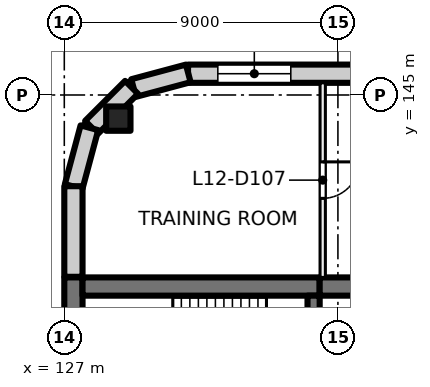
"""IFC4 building model, lengths in metres.
Left out: names, types, materials, properties, quantities, classifications, styles, units other than length and angle.
Written with IfcOpenShell. Run it as: python <this file> out.ifc"""

import sys

from ifc_helpers import new_model, si_unit, direction, frame, frame_2d, origin, origin_2d, place, context, subcontext, project, spatial, rectangle, extrude, element, fill, save


model = new_model("IFC4")
c1 = context("Model", 3, precision=1e-05, world=origin(), true_north=direction((0.0, 1.0)))
c2 = subcontext(c1, "Body", "Model", "MODEL_VIEW")
j1 = project(units=[si_unit("LENGTHUNIT", "METRE"), si_unit("PLANEANGLEUNIT", "RADIAN")], contexts=[c1])
p1 = place(None, origin())
s1 = spatial("IfcSite", under=j1, at=p1, CompositionType="ELEMENT")
p2 = place(p1, origin())
s2 = spatial("IfcBuilding", under=s1, at=p2, CompositionType="ELEMENT")
p3 = place(p2, frame((0.0, 0.0, 55.5)))
s3 = spatial("IfcBuildingStorey", under=s2, at=p3, CompositionType="ELEMENT", Elevation=55.5)
p4 = place(p3, frame((128.777, 144.223, 0.0), z_axis=(0.0, 0.0, 1.0), x_axis=(1.0, 0.0, 0.0)))
e1 = element("IfcColumn", 1, at=p4, inside=s3, PredefinedType="COLUMN", context=c2, shape_type="SweptSolid", body=[
    extrude(rectangle(XDim=0.8, YDim=0.8, at=origin_2d()), origin(), (0.0, 0.0, 1.0), 4.0),
])
p5 = place(p3, frame((127.3, 135.2, 0.0), z_axis=(0.0, 0.0, 1.0), x_axis=(0.0, 1.0, 0.0)))
e2 = element("IfcWall", 2, at=p5, inside=s3, PredefinedType="SHEAR", context=c2, shape_type="SweptSolid", body=[
    extrude(rectangle(XDim=3.8, YDim=0.6, at=frame_2d((1.9, 0.0))), origin(), (0.0, 0.0, 1.0), 4.0),
])
p6 = place(p3, frame((127.6, 138.7, 0.0), z_axis=(0.0, 0.0, 1.0), x_axis=(1.0, 0.0, 0.0)))
e3 = element("IfcWall", 3, at=p6, inside=s3, PredefinedType="SHEAR", context=c2, shape_type="SweptSolid", body=[
    extrude(rectangle(XDim=7.8, YDim=0.6, at=frame_2d((3.9, 0.0))), origin(), (0.0, 0.0, 1.0), 4.0),
])
p7 = place(p3, frame((135.4, 138.7, 0.0), z_axis=(0.0, 0.0, 1.0), x_axis=(1.0, 0.0, 0.0)))
e4 = element("IfcWall", 4, at=p7, inside=s3, PredefinedType="SHEAR", context=c2, shape_type="SweptSolid", body=[
    extrude(rectangle(XDim=4.6, YDim=0.6, at=frame_2d((2.3, 0.0))), origin(), (0.0, 0.0, 1.0), 4.0),
])
p8 = place(p3, frame((135.2, 135.6, 0.0), z_axis=(0.0, 0.0, 1.0), x_axis=(0.0, 1.0, 0.0)))
e5 = element("IfcWall", 5, at=p8, inside=s3, PredefinedType="SHEAR", context=c2, shape_type="SweptSolid", body=[
    extrude(rectangle(XDim=2.8, YDim=0.4, at=frame_2d((1.4, 0.0))), origin(), (0.0, 0.0, 1.0), 4.0),
])
p9 = place(p8, frame((0.9, 0.0, 0.0)))
e6 = element("IfcOpeningElement", 6, at=p9, cuts=e5, PredefinedType="OPENING", context=c2, shape_type="SweptSolid", body=[
    extrude(rectangle(XDim=1.0, YDim=2.1, at=frame_2d((0.5, 1.05))), frame((0.0, 0.21, 0.0), z_axis=(0.0, -1.0, 0.0), x_axis=(1.0, 0.0, 0.0)), (0.0, 0.0, 1.0), 0.42),
])
p10 = place(p3, frame((131.07, 145.7, 0.0), z_axis=(0.0, 0.0, 1.0), x_axis=(1.0, 0.0, 0.0)))
e7 = element("IfcWall", 7, at=p10, inside=s3, PredefinedType="SOLIDWALL", context=c2, shape_type="SweptSolid", body=[
    extrude(rectangle(XDim=31.93, YDim=0.6, at=frame_2d((15.965, 0.0))), origin(), (0.0, 0.0, 1.0), 3.625),
])
p11 = place(p10, frame((0.98, 0.0, 0.9)))
e8 = element("IfcOpeningElement", 8, at=p11, cuts=e7, PredefinedType="OPENING", context=c2, shape_type="SweptSolid", body=[
    extrude(rectangle(XDim=2.4, YDim=2.4, at=frame_2d((1.2, 1.2))), frame((0.0, 0.31, 0.0), z_axis=(0.0, -1.0, 0.0), x_axis=(1.0, 0.0, 0.0)), (0.0, 0.0, 1.0), 0.62),
])
p12 = place(p10, frame((5.48, 0.0, 0.9)))
e9 = element("IfcOpeningElement", 9, at=p12, cuts=e7, PredefinedType="OPENING", context=c2, shape_type="SweptSolid", body=[
    extrude(rectangle(XDim=2.4, YDim=2.4, at=frame_2d((1.2, 1.2))), frame((0.0, 0.31, 0.0), z_axis=(0.0, -1.0, 0.0), x_axis=(1.0, 0.0, 0.0)), (0.0, 0.0, 1.0), 0.62),
])
p13 = place(p10, frame((9.98, 0.0, 0.9)))
e10 = element("IfcOpeningElement", 10, at=p13, cuts=e7, PredefinedType="OPENING", context=c2, shape_type="SweptSolid", body=[
    extrude(rectangle(XDim=2.4, YDim=2.4, at=frame_2d((1.2, 1.2))), frame((0.0, 0.31, 0.0), z_axis=(0.0, -1.0, 0.0), x_axis=(1.0, 0.0, 0.0)), (0.0, 0.0, 1.0), 0.62),
])
p14 = place(p10, frame((14.48, 0.0, 0.9)))
e11 = element("IfcOpeningElement", 11, at=p14, cuts=e7, PredefinedType="OPENING", context=c2, shape_type="SweptSolid", body=[
    extrude(rectangle(XDim=2.4, YDim=2.4, at=frame_2d((1.2, 1.2))), frame((0.0, 0.31, 0.0), z_axis=(0.0, -1.0, 0.0), x_axis=(1.0, 0.0, 0.0)), (0.0, 0.0, 1.0), 0.62),
])
p15 = place(p10, frame((18.98, 0.0, 0.9)))
e12 = element("IfcOpeningElement", 12, at=p15, cuts=e7, PredefinedType="OPENING", context=c2, shape_type="SweptSolid", body=[
    extrude(rectangle(XDim=2.4, YDim=2.4, at=frame_2d((1.2, 1.2))), frame((0.0, 0.31, 0.0), z_axis=(0.0, -1.0, 0.0), x_axis=(1.0, 0.0, 0.0)), (0.0, 0.0, 1.0), 0.62),
])
p16 = place(p10, frame((23.48, 0.0, 0.9)))
e13 = element("IfcOpeningElement", 13, at=p16, cuts=e7, PredefinedType="OPENING", context=c2, shape_type="SweptSolid", body=[
    extrude(rectangle(XDim=2.4, YDim=2.4, at=frame_2d((1.2, 1.2))), frame((0.0, 0.31, 0.0), z_axis=(0.0, -1.0, 0.0), x_axis=(1.0, 0.0, 0.0)), (0.0, 0.0, 1.0), 0.62),
])
p17 = place(p10, frame((27.98, 0.0, 0.9)))
e14 = element("IfcOpeningElement", 14, at=p17, cuts=e7, PredefinedType="OPENING", context=c2, shape_type="SweptSolid", body=[
    extrude(rectangle(XDim=2.4, YDim=2.4, at=frame_2d((1.2, 1.2))), frame((0.0, 0.31, 0.0), z_axis=(0.0, -1.0, 0.0), x_axis=(1.0, 0.0, 0.0)), (0.0, 0.0, 1.0), 0.62),
])
for number, where, z_axis, x_axis in (
    (15, (129.281, 145.229, 0.0), (0.0, 0.0, 1.0), (0.966, 0.259, 0.0)),
    (16, (127.896, 143.936, 0.0), (0.0, 0.0, 1.0), (0.707, 0.707, 0.0)),
):
    element("IfcWall", number, at=place(p3, frame(where, z_axis=z_axis, x_axis=x_axis)), inside=s3, PredefinedType="SOLIDWALL", context=c2, shape_type="SweptSolid", body=[
        extrude(rectangle(XDim=1.861, YDim=0.6, at=frame_2d((0.93, 0.0))), origin(), (0.0, 0.0, 1.0), 3.625),
    ])
p18 = place(p3, frame((127.308, 141.99, 0.0), z_axis=(0.0, 0.0, 1.0), x_axis=(0.258839784042, 0.965920269068, 0.0)))
e17 = element("IfcWall", 17, at=p18, inside=s3, PredefinedType="SOLIDWALL", context=c2, shape_type="SweptSolid", body=[
    extrude(rectangle(XDim=2.0, YDim=0.6, at=frame_2d((1.0, 0.0))), origin(), (0.0, 0.0, 1.0), 3.625),
])
p19 = place(p3, frame((127.3, 139.02, 0.0), z_axis=(0.0, 0.0, 1.0), x_axis=(0.0, 1.0, 0.0)))
e18 = element("IfcWall", 18, at=p19, inside=s3, PredefinedType="SOLIDWALL", context=c2, shape_type="SweptSolid", body=[
    extrude(rectangle(XDim=2.98, YDim=0.6, at=frame_2d((1.49, 0.0))), origin(), (0.0, 0.0, 1.0), 3.625),
])
p20 = place(p3, frame((135.5, 145.4, 0.0), z_axis=(0.0, 0.0, 1.0), x_axis=(0.0, -1.0, 0.0)))
e19 = element("IfcWall", 19, at=p20, inside=s3, PredefinedType="PARTITIONING", context=c2, shape_type="SweptSolid", body=[
    extrude(rectangle(XDim=6.4, YDim=0.175, at=frame_2d((3.2, 0.0))), origin(), (0.0, 0.0, 1.0), 3.625),
])
p21 = place(p20, frame((2.6, 0.0, 0.0)))
e20 = element("IfcOpeningElement", 20, at=p21, cuts=e19, PredefinedType="OPENING", context=c2, shape_type="SweptSolid", body=[
    extrude(rectangle(XDim=1.2, YDim=2.1, at=frame_2d((0.6, 1.05))), frame((0.0, 0.097, 0.0), z_axis=(0.0, -1.0, 0.0), x_axis=(1.0, 0.0, 0.0)), (0.0, 0.0, 1.0), 0.195),
])
p22 = place(p11, origin())
e21 = element("IfcWindow", 21, at=p22, inside=s3, PartitioningType="SINGLE_PANEL", PredefinedType="WINDOW", context=c2, shape_type="SweptSolid", body=[
    extrude(rectangle(XDim=2.4, YDim=2.4, at=frame_2d((1.2, 1.2))), frame((0.0, 0.03, 0.0), z_axis=(0.0, -1.0, 0.0), x_axis=(1.0, 0.0, 0.0)), (0.0, 0.0, 1.0), 0.06),
])
fill(e8, e21)
p23 = place(p21, origin())
e22 = element("IfcDoor", 22, at=p23, inside=s3, OperationType="DOUBLE_DOOR_SINGLE_SWING", PredefinedType="DOOR", context=c2, shape_type="SweptSolid", body=[
    extrude(rectangle(XDim=1.2, YDim=2.1, at=frame_2d((0.6, 1.05))), frame((0.0, 0.025, 0.0), z_axis=(0.0, -1.0, 0.0), x_axis=(1.0, 0.0, 0.0)), (0.0, 0.0, 1.0), 0.05),
])
fill(e20, e22)
save(model, sys.argv[1])
